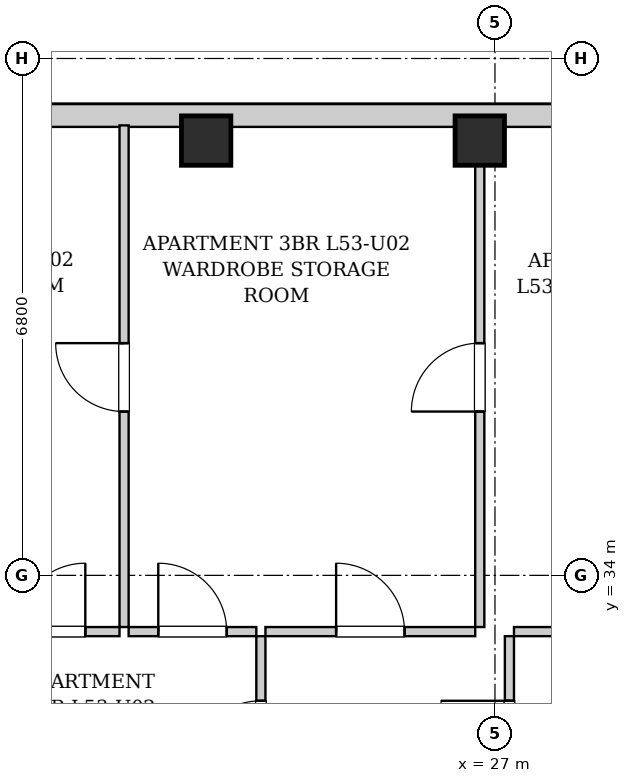
"""IFC4 building model, lengths in metres.
Left out: names, types, materials, properties, quantities, classifications, styles, units other than length and angle.
Written with IfcOpenShell. Run it as: python <this file> out.ifc"""

import sys

from ifc_helpers import new_model, si_unit, direction, frame, frame_2d, origin, origin_2d, place, context, subcontext, project, spatial, rectangle, extrude, element, fill, save


model = new_model("IFC4")
c1 = context("Model", 3, precision=1e-05, world=origin(), true_north=direction((0.0, 1.0)))
c2 = subcontext(c1, "Body", "Model", "MODEL_VIEW")
j1 = project(units=[si_unit("LENGTHUNIT", "METRE"), si_unit("PLANEANGLEUNIT", "RADIAN")], contexts=[c1])
p1 = place(None, origin())
s1 = spatial("IfcSite", under=j1, at=p1, CompositionType="ELEMENT")
p2 = place(p1, origin())
s2 = spatial("IfcBuilding", under=s1, at=p2, CompositionType="ELEMENT")
p3 = place(p2, frame((0.0, 0.0, 184.3)))
s3 = spatial("IfcBuildingStorey", under=s2, at=p3, CompositionType="ELEMENT", Elevation=184.3)
for number, where, z_axis, x_axis in (
    (1, (23.2, 39.72, 0.0), (0.0, 0.0, 1.0), (1.0, 0.0, 0.0)),
    (2, (26.8, 39.72, 0.0), (0.0, 0.0, 1.0), (1.0, 0.0, 0.0)),
):
    element("IfcColumn", number, at=place(p3, frame(where, z_axis=z_axis, x_axis=x_axis)), inside=s3, PredefinedType="COLUMN", context=c2, shape_type="SweptSolid", body=[
        extrude(rectangle(XDim=0.65, YDim=0.65, at=origin_2d()), origin(), (0.0, 0.0, 1.0), 3.3),
    ])
p4 = place(p3, frame((13.1, 40.05, 0.0), z_axis=(0.0, 0.0, 1.0), x_axis=(1.0, 0.0, 0.0)))
e3 = element("IfcWall", 3, at=p4, inside=s3, PredefinedType="SOLIDWALL", context=c2, shape_type="SweptSolid", body=[
    extrude(rectangle(XDim=17.5, YDim=0.3, at=frame_2d((8.75, 0.0))), origin(), (0.0, 0.0, 1.0), 3.04),
])
p5 = place(p4, frame((1.815, 0.0, 0.55)))
e4 = element("IfcOpeningElement", 4, at=p5, cuts=e3, PredefinedType="OPENING", context=c2, shape_type="SweptSolid", body=[
    extrude(rectangle(XDim=1.35, YDim=1.2, at=frame_2d((0.675, 0.6))), frame((0.0, 0.16, 0.0), z_axis=(0.0, -1.0, 0.0), x_axis=(1.0, 0.0, 0.0)), (0.0, 0.0, 1.0), 0.32),
])
p6 = place(p4, frame((6.189, 0.0, 0.55)))
e5 = element("IfcOpeningElement", 5, at=p6, cuts=e3, PredefinedType="OPENING", context=c2, shape_type="SweptSolid", body=[
    extrude(rectangle(XDim=1.35, YDim=1.2, at=frame_2d((0.675, 0.6))), frame((0.0, 0.16, 0.0), z_axis=(0.0, -1.0, 0.0), x_axis=(1.0, 0.0, 0.0)), (0.0, 0.0, 1.0), 0.32),
])
p7 = place(p4, frame((14.788, 0.0, 0.55)))
e6 = element("IfcOpeningElement", 6, at=p7, cuts=e3, PredefinedType="OPENING", context=c2, shape_type="SweptSolid", body=[
    extrude(rectangle(XDim=1.35, YDim=1.2, at=frame_2d((0.675, 0.6))), frame((0.0, 0.16, 0.0), z_axis=(0.0, -1.0, 0.0), x_axis=(1.0, 0.0, 0.0)), (0.0, 0.0, 1.0), 0.32),
])
p8 = place(p3, frame((23.92, 30.6, 0.0), z_axis=(0.0, 0.0, 1.0), x_axis=(0.0, 1.0, 0.0)))
e7 = element("IfcWall", 7, at=p8, inside=s3, PredefinedType="PARTITIONING", context=c2, shape_type="SweptSolid", body=[
    extrude(rectangle(XDim=2.6, YDim=0.12, at=frame_2d((1.3, 0.0))), origin(), (0.0, 0.0, 1.0), 3.04),
])
p9 = place(p8, frame((0.85, 0.0, 0.0)))
e8 = element("IfcOpeningElement", 8, at=p9, cuts=e7, PredefinedType="OPENING", context=c2, shape_type="SweptSolid", body=[
    extrude(rectangle(XDim=0.9, YDim=2.05, at=frame_2d((0.45, 1.025))), frame((0.0, 0.07, 0.0), z_axis=(0.0, -1.0, 0.0), x_axis=(1.0, 0.0, 0.0)), (0.0, 0.0, 1.0), 0.14),
])
p10 = place(p3, frame((20.26, 33.26, 0.0), z_axis=(0.0, 0.0, 1.0), x_axis=(1.0, 0.0, 0.0)))
e9 = element("IfcWall", 9, at=p10, inside=s3, PredefinedType="PARTITIONING", context=c2, shape_type="SweptSolid", body=[
    extrude(rectangle(XDim=1.8, YDim=0.12, at=frame_2d((0.9, 0.0))), origin(), (0.0, 0.0, 1.0), 3.04),
])
p11 = place(p10, frame((0.45, 0.0, 0.0)))
e10 = element("IfcOpeningElement", 10, at=p11, cuts=e9, PredefinedType="OPENING", context=c2, shape_type="SweptSolid", body=[
    extrude(rectangle(XDim=0.9, YDim=2.05, at=frame_2d((0.45, 1.025))), frame((0.0, 0.07, 0.0), z_axis=(0.0, -1.0, 0.0), x_axis=(1.0, 0.0, 0.0)), (0.0, 0.0, 1.0), 0.14),
])
p12 = place(p3, frame((22.18, 33.26, 0.0), z_axis=(0.0, 0.0, 1.0), x_axis=(1.0, 0.0, 0.0)))
e11 = element("IfcWall", 11, at=p12, inside=s3, PredefinedType="PARTITIONING", context=c2, shape_type="SweptSolid", body=[
    extrude(rectangle(XDim=1.68, YDim=0.12, at=frame_2d((0.84, 0.0))), origin(), (0.0, 0.0, 1.0), 3.04),
])
p13 = place(p12, frame((0.39, 0.0, 0.0)))
e12 = element("IfcOpeningElement", 12, at=p13, cuts=e11, PredefinedType="OPENING", context=c2, shape_type="SweptSolid", body=[
    extrude(rectangle(XDim=0.9, YDim=2.05, at=frame_2d((0.45, 1.025))), frame((0.0, 0.07, 0.0), z_axis=(0.0, -1.0, 0.0), x_axis=(1.0, 0.0, 0.0)), (0.0, 0.0, 1.0), 0.14),
])
p14 = place(p3, frame((27.19, 30.6, 0.0), z_axis=(0.0, 0.0, 1.0), x_axis=(0.0, 1.0, 0.0)))
e13 = element("IfcWall", 13, at=p14, inside=s3, PredefinedType="PARTITIONING", context=c2, shape_type="SweptSolid", body=[
    extrude(rectangle(XDim=2.6, YDim=0.12, at=frame_2d((1.3, 0.0))), origin(), (0.0, 0.0, 1.0), 3.04),
])
p15 = place(p14, frame((0.85, 0.0, 0.0)))
e14 = element("IfcOpeningElement", 14, at=p15, cuts=e13, PredefinedType="OPENING", context=c2, shape_type="SweptSolid", body=[
    extrude(rectangle(XDim=0.9, YDim=2.05, at=frame_2d((0.45, 1.025))), frame((0.0, 0.07, 0.0), z_axis=(0.0, -1.0, 0.0), x_axis=(1.0, 0.0, 0.0)), (0.0, 0.0, 1.0), 0.14),
])
p16 = place(p3, frame((23.98, 33.26, 0.0), z_axis=(0.0, 0.0, 1.0), x_axis=(1.0, 0.0, 0.0)))
e15 = element("IfcWall", 15, at=p16, inside=s3, PredefinedType="PARTITIONING", context=c2, shape_type="SweptSolid", body=[
    extrude(rectangle(XDim=2.76, YDim=0.12, at=frame_2d((1.38, 0.0))), origin(), (0.0, 0.0, 1.0), 3.04),
])
p17 = place(p16, frame((0.93, 0.0, 0.0)))
e16 = element("IfcOpeningElement", 16, at=p17, cuts=e15, PredefinedType="OPENING", context=c2, shape_type="SweptSolid", body=[
    extrude(rectangle(XDim=0.9, YDim=2.05, at=frame_2d((0.45, 1.025))), frame((0.0, 0.07, 0.0), z_axis=(0.0, -1.0, 0.0), x_axis=(1.0, 0.0, 0.0)), (0.0, 0.0, 1.0), 0.14),
])
p18 = place(p3, frame((27.25, 33.26, 0.0), z_axis=(0.0, 0.0, 1.0), x_axis=(1.0, 0.0, 0.0)))
e17 = element("IfcWall", 17, at=p18, inside=s3, PredefinedType="PARTITIONING", context=c2, shape_type="SweptSolid", body=[
    extrude(rectangle(XDim=3.09, YDim=0.12, at=frame_2d((1.545, 0.0))), origin(), (0.0, 0.0, 1.0), 3.04),
])
p19 = place(p18, frame((1.095, 0.0, 0.0)))
e18 = element("IfcOpeningElement", 18, at=p19, cuts=e17, PredefinedType="OPENING", context=c2, shape_type="SweptSolid", body=[
    extrude(rectangle(XDim=0.9, YDim=2.05, at=frame_2d((0.45, 1.025))), frame((0.0, 0.07, 0.0), z_axis=(0.0, -1.0, 0.0), x_axis=(1.0, 0.0, 0.0)), (0.0, 0.0, 1.0), 0.14),
])
p20 = place(p3, frame((22.12, 33.32, 0.0), z_axis=(0.0, 0.0, 1.0), x_axis=(0.0, 1.0, 0.0)))
e19 = element("IfcWall", 19, at=p20, inside=s3, PredefinedType="PARTITIONING", context=c2, shape_type="SweptSolid", body=[
    extrude(rectangle(XDim=6.6, YDim=0.12, at=frame_2d((3.3, 0.0))), origin(), (0.0, 0.0, 1.0), 3.04),
])
p21 = place(p20, frame((2.835, 0.0, 0.0)))
e20 = element("IfcOpeningElement", 20, at=p21, cuts=e19, PredefinedType="OPENING", context=c2, shape_type="SweptSolid", body=[
    extrude(rectangle(XDim=0.9, YDim=2.05, at=frame_2d((0.45, 1.025))), frame((0.0, 0.07, 0.0), z_axis=(0.0, -1.0, 0.0), x_axis=(1.0, 0.0, 0.0)), (0.0, 0.0, 1.0), 0.14),
])
p22 = place(p3, frame((26.8, 33.32, 0.0), z_axis=(0.0, 0.0, 1.0), x_axis=(0.0, 1.0, 0.0)))
e21 = element("IfcWall", 21, at=p22, inside=s3, PredefinedType="PARTITIONING", context=c2, shape_type="SweptSolid", body=[
    extrude(rectangle(XDim=6.6, YDim=0.12, at=frame_2d((3.3, 0.0))), origin(), (0.0, 0.0, 1.0), 3.04),
])
p23 = place(p22, frame((2.835, 0.0, 0.0)))
e22 = element("IfcOpeningElement", 22, at=p23, cuts=e21, PredefinedType="OPENING", context=c2, shape_type="SweptSolid", body=[
    extrude(rectangle(XDim=0.9, YDim=2.05, at=frame_2d((0.45, 1.025))), frame((0.0, 0.07, 0.0), z_axis=(0.0, -1.0, 0.0), x_axis=(1.0, 0.0, 0.0)), (0.0, 0.0, 1.0), 0.14),
])
p24 = place(p9, origin())
e23 = element("IfcDoor", 23, at=p24, inside=s3, OperationType="SINGLE_SWING_LEFT", PredefinedType="DOOR", context=c2, shape_type="SweptSolid", body=[
    extrude(rectangle(XDim=0.9, YDim=2.05, at=frame_2d((0.45, 1.025))), frame((0.0, 0.025, 0.0), z_axis=(0.0, -1.0, 0.0), x_axis=(1.0, 0.0, 0.0)), (0.0, 0.0, 1.0), 0.05),
])
fill(e8, e23)
p25 = place(p11, origin())
e24 = element("IfcDoor", 24, at=p25, inside=s3, OperationType="SINGLE_SWING_RIGHT", PredefinedType="DOOR", context=c2, shape_type="SweptSolid", body=[
    extrude(rectangle(XDim=0.9, YDim=2.05, at=frame_2d((0.45, 1.025))), frame((0.0, 0.025, 0.0), z_axis=(0.0, -1.0, 0.0), x_axis=(1.0, 0.0, 0.0)), (0.0, 0.0, 1.0), 0.05),
])
fill(e10, e24)
p26 = place(p13, origin())
e25 = element("IfcDoor", 25, at=p26, inside=s3, OperationType="SINGLE_SWING_LEFT", PredefinedType="DOOR", context=c2, shape_type="SweptSolid", body=[
    extrude(rectangle(XDim=0.9, YDim=2.05, at=frame_2d((0.45, 1.025))), frame((0.0, 0.025, 0.0), z_axis=(0.0, -1.0, 0.0), x_axis=(1.0, 0.0, 0.0)), (0.0, 0.0, 1.0), 0.05),
])
fill(e12, e25)
p27 = place(p15, origin())
e26 = element("IfcDoor", 26, at=p27, inside=s3, OperationType="SINGLE_SWING_RIGHT", PredefinedType="DOOR", context=c2, shape_type="SweptSolid", body=[
    extrude(rectangle(XDim=0.9, YDim=2.05, at=frame_2d((0.45, 1.025))), frame((0.0, 0.025, 0.0), z_axis=(0.0, -1.0, 0.0), x_axis=(1.0, 0.0, 0.0)), (0.0, 0.0, 1.0), 0.05),
])
fill(e14, e26)
p28 = place(p17, origin())
e27 = element("IfcDoor", 27, at=p28, inside=s3, OperationType="SINGLE_SWING_LEFT", PredefinedType="DOOR", context=c2, shape_type="SweptSolid", body=[
    extrude(rectangle(XDim=0.9, YDim=2.05, at=frame_2d((0.45, 1.025))), frame((0.0, 0.025, 0.0), z_axis=(0.0, -1.0, 0.0), x_axis=(1.0, 0.0, 0.0)), (0.0, 0.0, 1.0), 0.05),
])
fill(e16, e27)
p29 = place(p21, origin())
e28 = element("IfcDoor", 28, at=p29, inside=s3, OperationType="SINGLE_SWING_RIGHT", PredefinedType="DOOR", context=c2, shape_type="SweptSolid", body=[
    extrude(rectangle(XDim=0.9, YDim=2.05, at=frame_2d((0.45, 1.025))), frame((0.0, 0.025, 0.0), z_axis=(0.0, -1.0, 0.0), x_axis=(1.0, 0.0, 0.0)), (0.0, 0.0, 1.0), 0.05),
])
fill(e20, e28)
p30 = place(p23, origin())
e29 = element("IfcDoor", 29, at=p30, inside=s3, OperationType="SINGLE_SWING_LEFT", PredefinedType="DOOR", context=c2, shape_type="SweptSolid", body=[
    extrude(rectangle(XDim=0.9, YDim=2.05, at=frame_2d((0.45, 1.025))), frame((0.0, 0.025, 0.0), z_axis=(0.0, -1.0, 0.0), x_axis=(1.0, 0.0, 0.0)), (0.0, 0.0, 1.0), 0.05),
])
fill(e22, e29)
save(model, sys.argv[1])
